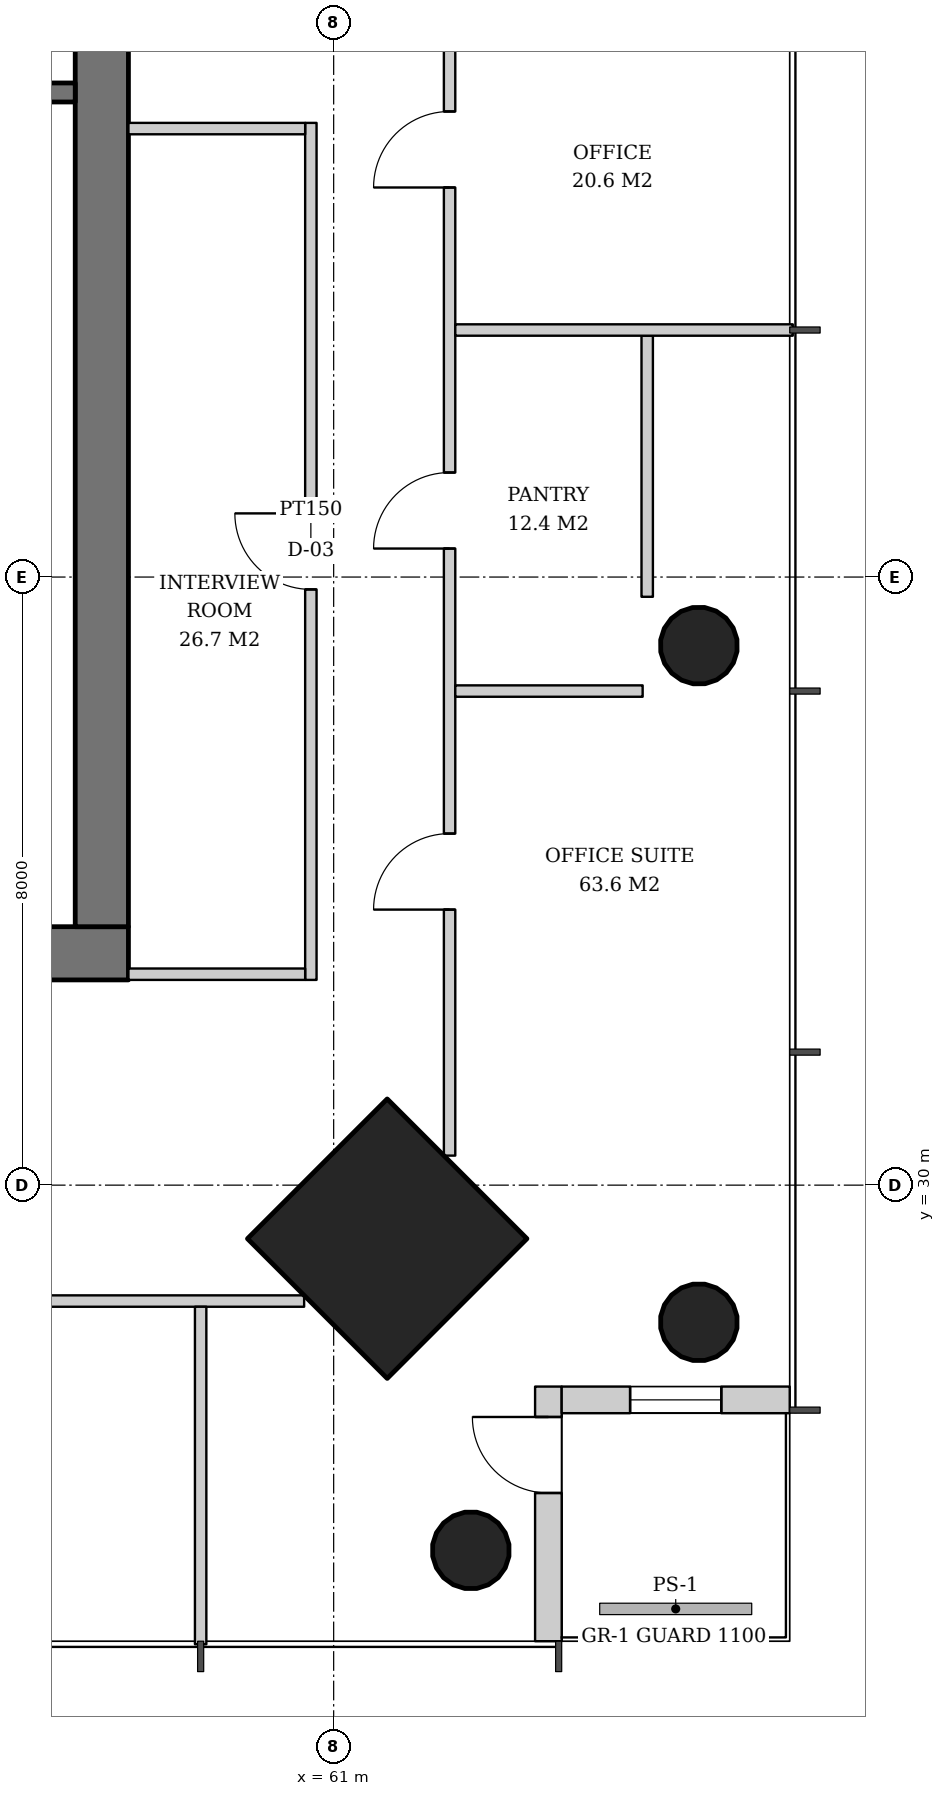
"""IFC4 building model, lengths in metres.
Left out: names, types, materials, properties, quantities, classifications, styles, units other than length and angle.
Written with IfcOpenShell. Run it as: python <this file> out.ifc"""

import sys

from ifc_helpers import new_model, si_unit, direction, frame, frame_2d, origin, origin_2d, place, context, subcontext, project, spatial, rectangle, hollow_circle, extrude, element, fill, save


model = new_model("IFC4")
c1 = context("Model", 3, precision=1e-05, world=origin(), true_north=direction((0.0, 1.0)))
c2 = subcontext(c1, "Body", "Model", "MODEL_VIEW")
j1 = project(units=[si_unit("LENGTHUNIT", "METRE"), si_unit("PLANEANGLEUNIT", "RADIAN")], contexts=[c1])
p1 = place(None, origin())
s1 = spatial("IfcSite", under=j1, at=p1, CompositionType="ELEMENT")
p2 = place(p1, origin())
s2 = spatial("IfcBuilding", under=s1, at=p2, CompositionType="ELEMENT")
p3 = place(p2, frame((0.0, 0.0, 119.8)))
s3 = spatial("IfcBuildingStorey", under=s2, at=p3, CompositionType="ELEMENT", Elevation=119.8)
p4 = place(p3, frame((65.843, 28.157, 0.0), z_axis=(-0.031898107953, 0.031898107953, 0.998981992539), x_axis=(-0.707106781187, -0.707106781187, 0.0)))
e1 = element("IfcColumn", 1, at=p4, inside=s3, PredefinedType="COLUMN", context=c2, shape_type="SweptSolid", body=[
    extrude(hollow_circle(Radius=0.508, WallThickness=0.04, at=origin_2d()), origin(), (0.0, 0.0, 1.0), 3.804),
])
p5 = place(p3, frame((65.843, 37.079, 0.0), z_axis=(-0.031910269556, 0.015987237665, 0.999362868496), x_axis=(-0.447933021895, -0.894067115991, 0.0)))
e2 = element("IfcColumn", 2, at=p5, inside=s3, PredefinedType="COLUMN", context=c2, shape_type="SweptSolid", body=[
    extrude(hollow_circle(Radius=0.508, WallThickness=0.04, at=origin_2d()), origin(), (0.0, 0.0, 1.0), 3.802),
])
p6 = place(p3, frame((61.743, 29.257, 0.0), z_axis=(-0.031962158256, 0.031962158256, 0.998977898093), x_axis=(-0.707106781187, -0.707106781187, 0.0)))
e3 = element("IfcColumn", 3, at=p6, inside=s3, PredefinedType="COLUMN", context=c2, shape_type="SweptSolid", body=[
    extrude(rectangle(XDim=2.6, YDim=2.6, at=origin_2d()), origin(), (0.0, 0.0, 1.0), 3.804),
])
p7 = place(p3, frame((62.843, 25.157, 0.0), z_axis=(-0.031898107953, 0.031898107953, 0.998981992539), x_axis=(-0.707106781187, -0.707106781187, 0.0)))
e4 = element("IfcColumn", 4, at=p7, inside=s3, PredefinedType="COLUMN", context=c2, shape_type="SweptSolid", body=[
    extrude(hollow_circle(Radius=0.508, WallThickness=0.04, at=origin_2d()), origin(), (0.0, 0.0, 1.0), 3.804),
])
p8 = place(p3, frame((31.7, 33.05, 0.0), z_axis=(0.0, 0.0, 1.0), x_axis=(1.0, 0.0, 0.0)))
e5 = element("IfcWall", 5, at=p8, inside=s3, PredefinedType="SHEAR", context=c2, shape_type="SweptSolid", body=[
    extrude(rectangle(XDim=26.6, YDim=0.7, at=frame_2d((13.3, 0.0))), origin(), (0.0, 0.0, 1.0), 3.8),
])
p9 = place(p8, frame((7.3, 0.0, 0.0)))
e6 = element("IfcOpeningElement", 6, at=p9, cuts=e5, PredefinedType="OPENING", context=c2, shape_type="SweptSolid", body=[
    extrude(rectangle(XDim=1.0, YDim=2.1, at=frame_2d((0.5, 1.05))), frame((0.0, 0.36, 0.0), z_axis=(0.0, -1.0, 0.0), x_axis=(1.0, 0.0, 0.0)), (0.0, 0.0, 1.0), 0.72),
])
p10 = place(p8, frame((18.75, 0.0, 0.0)))
e7 = element("IfcOpeningElement", 7, at=p10, cuts=e5, PredefinedType="OPENING", context=c2, shape_type="SweptSolid", body=[
    extrude(rectangle(XDim=1.0, YDim=2.1, at=frame_2d((0.5, 1.05))), frame((0.0, 0.36, 0.0), z_axis=(0.0, -1.0, 0.0), x_axis=(1.0, 0.0, 0.0)), (0.0, 0.0, 1.0), 0.72),
])
p11 = place(p8, frame((1.85, 0.0, 0.0)))
e8 = element("IfcOpeningElement", 8, at=p11, cuts=e5, PredefinedType="OPENING", context=c2, shape_type="SweptSolid", body=[
    extrude(rectangle(XDim=1.0, YDim=2.1, at=frame_2d((0.5, 1.05))), frame((0.0, 0.36, 0.0), z_axis=(0.0, -1.0, 0.0), x_axis=(1.0, 0.0, 0.0)), (0.0, 0.0, 1.0), 0.72),
])
p12 = place(p8, frame((4.7, 0.0, 0.0)))
e9 = element("IfcOpeningElement", 9, at=p12, cuts=e5, PredefinedType="OPENING", context=c2, shape_type="SweptSolid", body=[
    extrude(rectangle(XDim=1.0, YDim=2.1, at=frame_2d((0.5, 1.05))), frame((0.0, 0.36, 0.0), z_axis=(0.0, -1.0, 0.0), x_axis=(1.0, 0.0, 0.0)), (0.0, 0.0, 1.0), 0.72),
])
p13 = place(p8, frame((12.44, 0.0, 0.0)))
e10 = element("IfcOpeningElement", 10, at=p13, cuts=e5, PredefinedType="OPENING", context=c2, shape_type="SweptSolid", body=[
    extrude(rectangle(XDim=1.0, YDim=2.1, at=frame_2d((0.5, 1.05))), frame((0.0, 0.36, 0.0), z_axis=(0.0, -1.0, 0.0), x_axis=(1.0, 0.0, 0.0)), (0.0, 0.0, 1.0), 0.72),
])
p14 = place(p8, frame((20.644, 0.0, 0.0)))
e11 = element("IfcOpeningElement", 11, at=p14, cuts=e5, PredefinedType="OPENING", context=c2, shape_type="SweptSolid", body=[
    extrude(rectangle(XDim=1.0, YDim=2.1, at=frame_2d((0.5, 1.05))), frame((0.0, 0.36, 0.0), z_axis=(0.0, -1.0, 0.0), x_axis=(1.0, 0.0, 0.0)), (0.0, 0.0, 1.0), 0.72),
])
p15 = place(p8, frame((23.544, 0.0, 0.0)))
e12 = element("IfcOpeningElement", 12, at=p15, cuts=e5, PredefinedType="OPENING", context=c2, shape_type="SweptSolid", body=[
    extrude(rectangle(XDim=1.0, YDim=2.1, at=frame_2d((0.5, 1.05))), frame((0.0, 0.36, 0.0), z_axis=(0.0, -1.0, 0.0), x_axis=(1.0, 0.0, 0.0)), (0.0, 0.0, 1.0), 0.72),
])
p16 = place(p3, frame((57.95, 33.4, 0.0), z_axis=(0.0, 0.0, 1.0), x_axis=(0.0, 1.0, 0.0)))
e13 = element("IfcWall", 13, at=p16, inside=s3, PredefinedType="SHEAR", context=c2, shape_type="SweptSolid", body=[
    extrude(rectangle(XDim=25.2, YDim=0.7, at=frame_2d((12.6, 0.0))), origin(), (0.0, 0.0, 1.0), 3.8),
])
p17 = place(p16, frame((11.7, 0.0, 0.0)))
e14 = element("IfcOpeningElement", 14, at=p17, cuts=e13, PredefinedType="OPENING", context=c2, shape_type="SweptSolid", body=[
    extrude(rectangle(XDim=1.8, YDim=2.4, at=frame_2d((0.9, 1.2))), frame((0.0, 0.36, 0.0), z_axis=(0.0, -1.0, 0.0), x_axis=(1.0, 0.0, 0.0)), (0.0, 0.0, 1.0), 0.72),
])
p18 = place(p3, frame((63.825, 24.0, 0.0), z_axis=(0.0, 0.0, 1.0), x_axis=(0.0, 1.0, 0.0)))
e15 = element("IfcWall", 15, at=p18, inside=s3, PredefinedType="SOLIDWALL", context=c2, shape_type="SweptSolid", body=[
    extrude(rectangle(XDim=3.35, YDim=0.35, at=frame_2d((1.675, 0.0))), origin(), (0.0, 0.0, 1.0), 3.62),
])
p19 = place(p18, frame((1.95, 0.0, 0.0)))
e16 = element("IfcOpeningElement", 16, at=p19, cuts=e15, PredefinedType="OPENING", context=c2, shape_type="SweptSolid", body=[
    extrude(rectangle(XDim=1.0, YDim=2.4, at=frame_2d((0.5, 1.2))), frame((0.0, 0.185, 0.0), z_axis=(0.0, -1.0, 0.0), x_axis=(1.0, 0.0, 0.0)), (0.0, 0.0, 1.0), 0.37),
])
p20 = place(p3, frame((64.0, 27.175, 0.0), z_axis=(0.0, 0.0, 1.0), x_axis=(1.0, 0.0, 0.0)))
e17 = element("IfcWall", 17, at=p20, inside=s3, PredefinedType="SOLIDWALL", context=c2, shape_type="SweptSolid", body=[
    extrude(rectangle(XDim=3.0, YDim=0.35, at=frame_2d((1.5, 0.0))), origin(), (0.0, 0.0, 1.0), 3.62),
])
p21 = place(p20, frame((0.9, 0.0, 0.6)))
e18 = element("IfcOpeningElement", 18, at=p21, cuts=e17, PredefinedType="OPENING", context=c2, shape_type="SweptSolid", body=[
    extrude(rectangle(XDim=1.2, YDim=2.55, at=frame_2d((0.6, 1.275))), frame((0.0, 0.185, 0.0), z_axis=(0.0, -1.0, 0.0), x_axis=(1.0, 0.0, 0.0)), (0.0, 0.0, 1.0), 0.37),
])
p22 = place(p3, frame((54.9, 44.375, 0.0), z_axis=(0.0, 0.0, 1.0), x_axis=(1.0, 0.0, 0.0)))
e19 = element("IfcWall", 19, at=p22, inside=s3, PredefinedType="SOLIDWALL", context=c2, shape_type="SweptSolid", body=[
    extrude(rectangle(XDim=2.7, YDim=0.25, at=frame_2d((1.35, 0.0))), origin(), (0.0, 0.0, 1.0), 3.62),
])
p23 = place(p3, frame((60.7, 32.7, 0.0), z_axis=(0.0, 0.0, 1.0), x_axis=(0.0, 1.0, 0.0)))
e20 = element("IfcWall", 20, at=p23, inside=s3, PredefinedType="PARTITIONING", context=c2, shape_type="SweptSolid", body=[
    extrude(rectangle(XDim=11.275, YDim=0.15, at=frame_2d((5.638, 0.0))), origin(), (0.0, 0.0, 1.0), 2.72),
])
p24 = place(p23, frame((5.137, 0.0, 0.0)))
e21 = element("IfcOpeningElement", 21, at=p24, cuts=e20, PredefinedType="OPENING", context=c2, shape_type="SweptSolid", body=[
    extrude(rectangle(XDim=1.0, YDim=2.1, at=frame_2d((0.5, 1.05))), frame((0.0, 0.085, 0.0), z_axis=(0.0, -1.0, 0.0), x_axis=(1.0, 0.0, 0.0)), (0.0, 0.0, 1.0), 0.17),
])
for number, where, z_axis, x_axis in (
    (22, (58.3, 32.775, 0.0), (0.0, 0.0, 1.0), (1.0, 0.0, 0.0)),
    (23, (58.3, 43.9, 0.0), (0.0, 0.0, 1.0), (1.0, 0.0, 0.0)),
):
    element("IfcWall", number, at=place(p3, frame(where, z_axis=z_axis, x_axis=x_axis)), inside=s3, PredefinedType="PARTITIONING", context=c2, shape_type="SweptSolid", body=[
        extrude(rectangle(XDim=2.325, YDim=0.15, at=frame_2d((1.163, 0.0))), origin(), (0.0, 0.0, 1.0), 3.62),
    ])
p25 = place(p3, frame((65.125, 37.74, 0.0), z_axis=(0.0, 0.0, 1.0), x_axis=(0.0, 1.0, 0.0)))
e24 = element("IfcWall", 24, at=p25, inside=s3, PredefinedType="PARTITIONING", context=c2, shape_type="SweptSolid", body=[
    extrude(rectangle(XDim=3.435, YDim=0.15, at=frame_2d((1.717, 0.0))), origin(), (0.0, 0.0, 1.0), 3.62),
])
p26 = place(p3, frame((62.525, 30.388, 0.0), z_axis=(0.0, 0.0, 1.0), x_axis=(0.0, 1.0, 0.0)))
e25 = element("IfcWall", 25, at=p26, inside=s3, PredefinedType="PARTITIONING", context=c2, shape_type="SweptSolid", body=[
    extrude(rectangle(XDim=31.223, YDim=0.15, at=frame_2d((15.612, 0.0))), origin(), (0.0, 0.0, 1.0), 2.72),
])
p27 = place(p26, frame((3.237, 0.0, 0.0)))
e26 = element("IfcOpeningElement", 26, at=p27, cuts=e25, PredefinedType="OPENING", context=c2, shape_type="SweptSolid", body=[
    extrude(rectangle(XDim=1.0, YDim=2.1, at=frame_2d((0.5, 1.05))), frame((0.0, 0.085, 0.0), z_axis=(0.0, -1.0, 0.0), x_axis=(1.0, 0.0, 0.0)), (0.0, 0.0, 1.0), 0.17),
])
p28 = place(p26, frame((7.987, 0.0, 0.0)))
e27 = element("IfcOpeningElement", 27, at=p28, cuts=e25, PredefinedType="OPENING", context=c2, shape_type="SweptSolid", body=[
    extrude(rectangle(XDim=1.0, YDim=2.1, at=frame_2d((0.5, 1.05))), frame((0.0, 0.085, 0.0), z_axis=(0.0, -1.0, 0.0), x_axis=(1.0, 0.0, 0.0)), (0.0, 0.0, 1.0), 0.17),
])
p29 = place(p26, frame((12.737, 0.0, 0.0)))
e28 = element("IfcOpeningElement", 28, at=p29, cuts=e25, PredefinedType="OPENING", context=c2, shape_type="SweptSolid", body=[
    extrude(rectangle(XDim=1.0, YDim=2.1, at=frame_2d((0.5, 1.05))), frame((0.0, 0.085, 0.0), z_axis=(0.0, -1.0, 0.0), x_axis=(1.0, 0.0, 0.0)), (0.0, 0.0, 1.0), 0.17),
])
p30 = place(p26, frame((17.487, 0.0, 0.0)))
e29 = element("IfcOpeningElement", 29, at=p30, cuts=e25, PredefinedType="OPENING", context=c2, shape_type="SweptSolid", body=[
    extrude(rectangle(XDim=1.0, YDim=2.1, at=frame_2d((0.5, 1.05))), frame((0.0, 0.085, 0.0), z_axis=(0.0, -1.0, 0.0), x_axis=(1.0, 0.0, 0.0)), (0.0, 0.0, 1.0), 0.17),
])
p31 = place(p26, frame((26.987, 0.0, 0.0)))
e30 = element("IfcOpeningElement", 30, at=p31, cuts=e25, PredefinedType="OPENING", context=c2, shape_type="SweptSolid", body=[
    extrude(rectangle(XDim=1.0, YDim=2.1, at=frame_2d((0.5, 1.05))), frame((0.0, 0.085, 0.0), z_axis=(0.0, -1.0, 0.0), x_axis=(1.0, 0.0, 0.0)), (0.0, 0.0, 1.0), 0.17),
])
p32 = place(p3, frame((62.6, 36.5, 0.0), z_axis=(0.0, 0.0, 1.0), x_axis=(1.0, 0.0, 0.0)))
e31 = element("IfcWall", 31, at=p32, inside=s3, PredefinedType="PARTITIONING", context=c2, shape_type="SweptSolid", body=[
    extrude(rectangle(XDim=2.465, YDim=0.15, at=frame_2d((1.232, 0.0))), origin(), (0.0, 0.0, 1.0), 3.62),
])
p33 = place(p3, frame((62.6, 41.25, 0.0), z_axis=(0.0, 0.0, 1.0), x_axis=(1.0, 0.0, 0.0)))
e32 = element("IfcWall", 32, at=p33, inside=s3, PredefinedType="PARTITIONING", context=c2, shape_type="SweptSolid", body=[
    extrude(rectangle(XDim=4.44, YDim=0.15, at=frame_2d((2.22, 0.0))), origin(), (0.0, 0.0, 1.0), 2.82),
])
p34 = place(p3, frame((29.388, 28.475, 0.0), z_axis=(0.0, 0.0, 1.0), x_axis=(1.0, 0.0, 0.0)))
e33 = element("IfcWall", 33, at=p34, inside=s3, PredefinedType="PARTITIONING", context=c2, shape_type="SweptSolid", body=[
    extrude(rectangle(XDim=31.223, YDim=0.15, at=frame_2d((15.612, 0.0))), origin(), (0.0, 0.0, 1.0), 2.72),
])
p35 = place(p34, frame((2.836, 0.0, 0.0)))
e34 = element("IfcOpeningElement", 34, at=p35, cuts=e33, PredefinedType="OPENING", context=c2, shape_type="SweptSolid", body=[
    extrude(rectangle(XDim=1.8, YDim=2.4, at=frame_2d((0.9, 1.2))), frame((0.0, 0.085, 0.0), z_axis=(0.0, -1.0, 0.0), x_axis=(1.0, 0.0, 0.0)), (0.0, 0.0, 1.0), 0.17),
])
p36 = place(p34, frame((7.586, 0.0, 0.0)))
e35 = element("IfcOpeningElement", 35, at=p36, cuts=e33, PredefinedType="OPENING", context=c2, shape_type="SweptSolid", body=[
    extrude(rectangle(XDim=1.8, YDim=2.4, at=frame_2d((0.9, 1.2))), frame((0.0, 0.085, 0.0), z_axis=(0.0, -1.0, 0.0), x_axis=(1.0, 0.0, 0.0)), (0.0, 0.0, 1.0), 0.17),
])
p37 = place(p3, frame((59.25, 28.4, 0.0), z_axis=(0.0, 0.0, 1.0), x_axis=(0.0, -1.0, 0.0)))
e36 = element("IfcWall", 36, at=p37, inside=s3, PredefinedType="PARTITIONING", context=c2, shape_type="SweptSolid", body=[
    extrude(rectangle(XDim=4.44, YDim=0.15, at=frame_2d((2.22, 0.0))), origin(), (0.0, 0.0, 1.0), 2.82),
])
p38 = place(p19, origin())
e37 = element("IfcDoor", 37, at=p38, inside=s3, OperationType="SINGLE_SWING_RIGHT", PredefinedType="DOOR", context=c2, shape_type="SweptSolid", body=[
    extrude(rectangle(XDim=1.0, YDim=2.4, at=frame_2d((0.5, 1.2))), frame((0.0, 0.025, 0.0), z_axis=(0.0, -1.0, 0.0), x_axis=(1.0, 0.0, 0.0)), (0.0, 0.0, 1.0), 0.05),
])
fill(e16, e37)
p39 = place(p21, origin())
e38 = element("IfcWindow", 38, at=p39, inside=s3, PartitioningType="SINGLE_PANEL", PredefinedType="WINDOW", context=c2, shape_type="SweptSolid", body=[
    extrude(rectangle(XDim=1.2, YDim=2.55, at=frame_2d((0.6, 1.275))), frame((0.0, 0.03, 0.0), z_axis=(0.0, -1.0, 0.0), x_axis=(1.0, 0.0, 0.0)), (0.0, 0.0, 1.0), 0.06),
])
fill(e18, e38)
p40 = place(p24, origin())
e39 = element("IfcDoor", 39, at=p40, inside=s3, OperationType="SINGLE_SWING_RIGHT", PredefinedType="DOOR", context=c2, shape_type="SweptSolid", body=[
    extrude(rectangle(XDim=1.0, YDim=2.1, at=frame_2d((0.5, 1.05))), frame((0.0, 0.025, 0.0), z_axis=(0.0, -1.0, 0.0), x_axis=(1.0, 0.0, 0.0)), (0.0, 0.0, 1.0), 0.05),
])
fill(e21, e39)
p41 = place(p27, origin())
e40 = element("IfcDoor", 40, at=p41, inside=s3, OperationType="SINGLE_SWING_LEFT", PredefinedType="DOOR", context=c2, shape_type="SweptSolid", body=[
    extrude(rectangle(XDim=1.0, YDim=2.1, at=frame_2d((0.5, 1.05))), frame((0.0, 0.025, 0.0), z_axis=(0.0, -1.0, 0.0), x_axis=(1.0, 0.0, 0.0)), (0.0, 0.0, 1.0), 0.05),
])
fill(e26, e40)
p42 = place(p28, origin())
e41 = element("IfcDoor", 41, at=p42, inside=s3, OperationType="SINGLE_SWING_LEFT", PredefinedType="DOOR", context=c2, shape_type="SweptSolid", body=[
    extrude(rectangle(XDim=1.0, YDim=2.1, at=frame_2d((0.5, 1.05))), frame((0.0, 0.025, 0.0), z_axis=(0.0, -1.0, 0.0), x_axis=(1.0, 0.0, 0.0)), (0.0, 0.0, 1.0), 0.05),
])
fill(e27, e41)
p43 = place(p29, origin())
e42 = element("IfcDoor", 42, at=p43, inside=s3, OperationType="SINGLE_SWING_LEFT", PredefinedType="DOOR", context=c2, shape_type="SweptSolid", body=[
    extrude(rectangle(XDim=1.0, YDim=2.1, at=frame_2d((0.5, 1.05))), frame((0.0, 0.025, 0.0), z_axis=(0.0, -1.0, 0.0), x_axis=(1.0, 0.0, 0.0)), (0.0, 0.0, 1.0), 0.05),
])
fill(e28, e42)
save(model, sys.argv[1])
